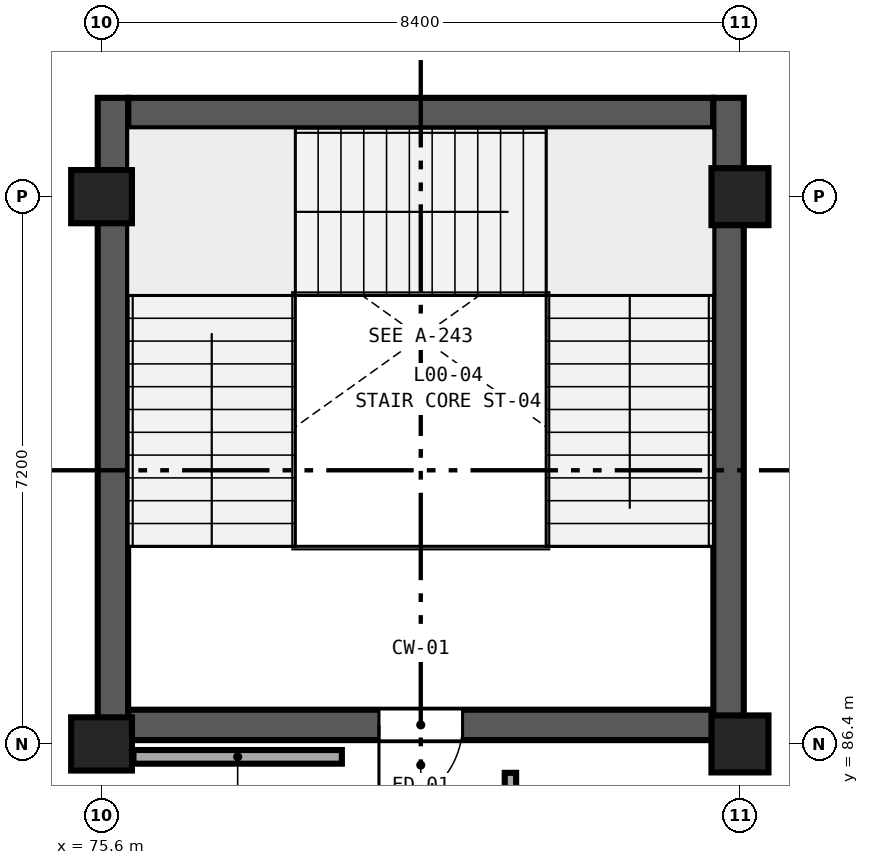
"""IFC4 building model, lengths in metres.
Left out: names, types, materials, properties, quantities, classifications, styles, units other than length and angle.
Written with IfcOpenShell. Run it as: python <this file> out.ifc"""

import sys

from ifc_helpers import new_model, si_unit, direction, frame, frame_2d, origin, origin_2d, place, context, subcontext, project, spatial, rectangle, extrude, element, fill, save


model = new_model("IFC4")
c1 = context("Model", 3, precision=1e-05, world=origin(), true_north=direction((0.0, 1.0)))
c2 = subcontext(c1, "Body", "Model", "MODEL_VIEW")
j1 = project(units=[si_unit("LENGTHUNIT", "METRE"), si_unit("PLANEANGLEUNIT", "RADIAN")], contexts=[c1])
p1 = place(None, origin())
s1 = spatial("IfcSite", under=j1, at=p1, CompositionType="ELEMENT")
p2 = place(p1, origin())
s2 = spatial("IfcBuilding", under=s1, at=p2, CompositionType="ELEMENT")
p3 = place(p2, origin())
s3 = spatial("IfcBuildingStorey", under=s2, at=p3, CompositionType="ELEMENT", Elevation=0.0)
for number, where, z_axis, x_axis in (
    (1, (75.6, 86.4, 0.0), (0.0, 0.0, 1.0), (1.0, 0.0, 0.0)),
    (2, (75.6, 93.6, 0.0), (0.0, 0.0, 1.0), (1.0, 0.0, 0.0)),
):
    element("IfcColumn", number, at=place(p3, frame(where, z_axis=z_axis, x_axis=x_axis)), inside=s3, PredefinedType="COLUMN", context=c2, shape_type="SweptSolid", body=[
        extrude(rectangle(XDim=0.8, YDim=0.7, at=origin_2d()), origin(), (0.0, 0.0, 1.0), 5.4),
    ])
for number, where, z_axis, x_axis in (
    (3, (84.0, 86.4, 0.0), (0.0, 0.0, 1.0), (1.0, 0.0, 0.0)),
    (4, (84.0, 93.6, 0.0), (0.0, 0.0, 1.0), (1.0, 0.0, 0.0)),
):
    element("IfcColumn", number, at=place(p3, frame(where, z_axis=z_axis, x_axis=x_axis)), inside=s3, PredefinedType="COLUMN", context=c2, shape_type="SweptSolid", body=[
        extrude(rectangle(XDim=0.75, YDim=0.75, at=origin_2d()), origin(), (0.0, 0.0, 1.0), 5.4),
    ])
p4 = place(p3, frame((83.65, 86.65, 0.0), z_axis=(0.0, 0.0, 1.0), x_axis=(-1.0, 0.0, 0.0)))
e5 = element("IfcWall", 5, at=p4, inside=s3, PredefinedType="SHEAR", context=c2, shape_type="SweptSolid", body=[
    extrude(rectangle(XDim=7.7, YDim=0.4, at=frame_2d((3.85, 0.0))), origin(), (0.0, 0.0, 1.0), 5.4),
])
p5 = place(p4, frame((3.3, 0.0, 0.0)))
e6 = element("IfcOpeningElement", 6, at=p5, cuts=e5, PredefinedType="OPENING", context=c2, shape_type="SweptSolid", body=[
    extrude(rectangle(XDim=1.1, YDim=2.2, at=frame_2d((0.55, 1.1))), frame((0.0, 0.22, 0.0), z_axis=(0.0, -1.0, 0.0), x_axis=(1.0, 0.0, 0.0)), (0.0, 0.0, 1.0), 0.44),
])
p6 = place(p3, frame((75.95, 94.7, 0.0), z_axis=(0.0, 0.0, 1.0), x_axis=(1.0, 0.0, 0.0)))
e7 = element("IfcWall", 7, at=p6, inside=s3, PredefinedType="SHEAR", context=c2, shape_type="SweptSolid", body=[
    extrude(rectangle(XDim=7.7, YDim=0.4, at=frame_2d((3.85, 0.0))), origin(), (0.0, 0.0, 1.0), 5.4),
])
for number, where, z_axis, x_axis in (
    (8, (75.75, 94.9, 0.0), (0.0, 0.0, 1.0), (0.0, -1.0, 0.0)),
    (9, (83.85, 86.45, 0.0), (0.0, 0.0, 1.0), (0.0, 1.0, 0.0)),
):
    element("IfcWall", number, at=place(p3, frame(where, z_axis=z_axis, x_axis=x_axis)), inside=s3, PredefinedType="SHEAR", context=c2, shape_type="SweptSolid", body=[
        extrude(rectangle(XDim=8.45, YDim=0.4, at=frame_2d((4.225, 0.0))), origin(), (0.0, 0.0, 1.0), 5.4),
    ])
p7 = place(p3, frame((76.02, 86.23, 0.0), z_axis=(0.0, 0.0, 1.0), x_axis=(1.0, 0.0, 0.0)))
e10 = element("IfcWall", 10, at=p7, inside=s3, PredefinedType="PARTITIONING", context=c2, shape_type="SweptSolid", body=[
    extrude(rectangle(XDim=2.742, YDim=0.18, at=frame_2d((1.371, 0.0))), origin(), (0.0, 0.0, 1.0), 4.58),
])
p8 = place(p3, frame((80.98, 84.18, 0.0), z_axis=(0.0, 0.0, 1.0), x_axis=(0.0, 1.0, 0.0)))
e11 = element("IfcWall", 11, at=p8, inside=s3, PredefinedType="PARTITIONING", context=c2, shape_type="SweptSolid", body=[
    extrude(rectangle(XDim=1.84, YDim=0.15, at=frame_2d((0.92, 0.0))), origin(), (0.0, 0.0, 1.0), 5.08),
])
p9 = place(p8, frame((0.24, 0.0, 0.0)))
e12 = element("IfcOpeningElement", 12, at=p9, cuts=e11, PredefinedType="OPENING", context=c2, shape_type="SweptSolid", body=[
    extrude(rectangle(XDim=1.36, YDim=2.05, at=frame_2d((0.68, 1.025))), frame((0.0, 0.095, 0.0), z_axis=(0.0, -1.0, 0.0), x_axis=(1.0, 0.0, 0.0)), (0.0, 0.0, 1.0), 0.19),
])
p10 = place(p5, origin())
e13 = element("IfcDoor", 13, at=p10, inside=s3, OperationType="SINGLE_SWING_RIGHT", PredefinedType="DOOR", context=c2, shape_type="SweptSolid", body=[
    extrude(rectangle(XDim=1.1, YDim=2.2, at=frame_2d((0.55, 1.1))), frame((0.0, 0.025, 0.0), z_axis=(0.0, -1.0, 0.0), x_axis=(1.0, 0.0, 0.0)), (0.0, 0.0, 1.0), 0.05),
])
fill(e6, e13)
save(model, sys.argv[1])
